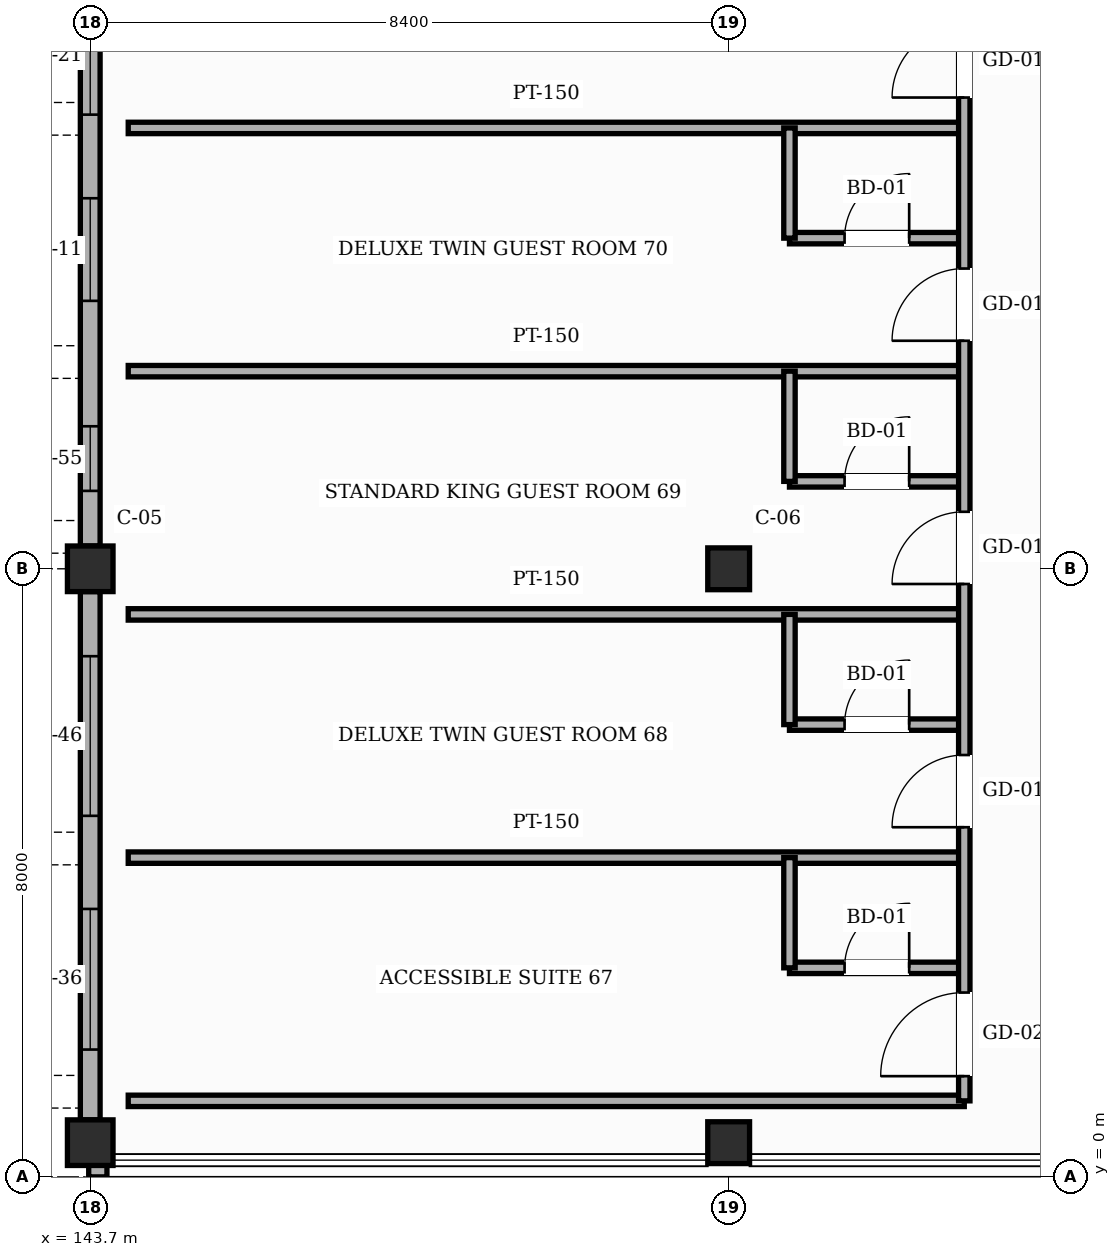
"""IFC4 building model, lengths in metres.
Left out: names, types, materials, properties, quantities, classifications, styles, units other than length and angle.
Written with IfcOpenShell. Run it as: python <this file> out.ifc"""

import sys

from ifc_helpers import new_model, si_unit, direction, frame, frame_2d, origin, origin_2d, place, context, subcontext, project, spatial, rectangle, hollow_rectangle, extrude, element, fill, save


model = new_model("IFC4")
c1 = context("Model", 3, precision=1e-05, world=origin(), true_north=direction((0.0, 1.0)))
c2 = subcontext(c1, "Body", "Model", "MODEL_VIEW")
j1 = project(units=[si_unit("LENGTHUNIT", "METRE"), si_unit("PLANEANGLEUNIT", "RADIAN")], contexts=[c1])
p1 = place(None, origin())
s1 = spatial("IfcSite", under=j1, at=p1, CompositionType="ELEMENT")
p2 = place(p1, origin())
s2 = spatial("IfcBuilding", under=s1, at=p2, CompositionType="ELEMENT")
p3 = place(p2, frame((0.0, 0.0, 24.6)))
s3 = spatial("IfcBuildingStorey", under=s2, at=p3, CompositionType="ELEMENT", Elevation=24.6)
for number, where, z_axis, x_axis in (
    (1, (143.7, 0.45, 0.0), (0.0, 0.0, 1.0), (1.0, 0.0, 0.0)),
    (2, (143.7, 8.0, 0.0), (0.0, 0.0, 1.0), (1.0, 0.0, 0.0)),
):
    element("IfcColumn", number, at=place(p3, frame(where, z_axis=z_axis, x_axis=x_axis)), inside=s3, PredefinedType="COLUMN", context=c2, shape_type="SweptSolid", body=[
        extrude(hollow_rectangle(XDim=0.6, YDim=0.6, WallThickness=0.025, InnerFilletRadius=0.025, OuterFilletRadius=0.05, at=origin_2d()), origin(), (0.0, 0.0, 1.0), 3.6),
    ])
for number, where, z_axis, x_axis in (
    (3, (152.1, 0.45, 0.0), (0.0, 0.0, 1.0), (1.0, 0.0, 0.0)),
    (4, (152.1, 8.0, 0.0), (0.0, 0.0, 1.0), (1.0, 0.0, 0.0)),
):
    element("IfcColumn", number, at=place(p3, frame(where, z_axis=z_axis, x_axis=x_axis)), inside=s3, PredefinedType="COLUMN", context=c2, shape_type="SweptSolid", body=[
        extrude(hollow_rectangle(XDim=0.55, YDim=0.55, WallThickness=0.022, InnerFilletRadius=0.022, OuterFilletRadius=0.044, at=origin_2d()), origin(), (0.0, 0.0, 1.0), 3.6),
    ])
p4 = place(p3, frame((143.7, 0.75, 0.0), z_axis=(0.0, 0.0, 1.0), x_axis=(0.0, 1.0, 0.0)))
e5 = element("IfcWall", 5, at=p4, inside=s3, PredefinedType="SOLIDWALL", context=c2, shape_type="SweptSolid", body=[
    extrude(rectangle(XDim=6.95, YDim=0.26, at=frame_2d((3.475, 0.0))), origin(), (0.0, 0.0, 1.0), 2.805),
])
p5 = place(p4, frame((0.925, 0.0, 0.85)))
e6 = element("IfcOpeningElement", 6, at=p5, cuts=e5, PredefinedType="OPENING", context=c2, shape_type="SweptSolid", body=[
    extrude(rectangle(XDim=1.85, YDim=1.35, at=frame_2d((0.925, 0.675))), frame((0.0, 0.14, 0.0), z_axis=(0.0, -1.0, 0.0), x_axis=(1.0, 0.0, 0.0)), (0.0, 0.0, 1.0), 0.28),
])
p6 = place(p4, frame((4.0, 0.0, 0.85)))
e7 = element("IfcOpeningElement", 7, at=p6, cuts=e5, PredefinedType="OPENING", context=c2, shape_type="SweptSolid", body=[
    extrude(rectangle(XDim=2.1, YDim=1.35, at=frame_2d((1.05, 0.675))), frame((0.0, 0.14, 0.0), z_axis=(0.0, -1.0, 0.0), x_axis=(1.0, 0.0, 0.0)), (0.0, 0.0, 1.0), 0.28),
])
p7 = place(p3, frame((143.7, 8.3, 0.0), z_axis=(0.0, 0.0, 1.0), x_axis=(0.0, 1.0, 0.0)))
e8 = element("IfcWall", 8, at=p7, inside=s3, PredefinedType="SOLIDWALL", context=c2, shape_type="SweptSolid", body=[
    extrude(rectangle(XDim=7.4, YDim=0.26, at=frame_2d((3.7, 0.0))), origin(), (0.0, 0.0, 1.0), 2.805),
])
p8 = place(p7, frame((0.725, 0.0, 0.85)))
e9 = element("IfcOpeningElement", 9, at=p8, cuts=e8, PredefinedType="OPENING", context=c2, shape_type="SweptSolid", body=[
    extrude(rectangle(XDim=0.85, YDim=1.35, at=frame_2d((0.425, 0.675))), frame((0.0, 0.14, 0.0), z_axis=(0.0, -1.0, 0.0), x_axis=(1.0, 0.0, 0.0)), (0.0, 0.0, 1.0), 0.28),
])
p9 = place(p7, frame((3.225, 0.0, 0.85)))
e10 = element("IfcOpeningElement", 10, at=p9, cuts=e8, PredefinedType="OPENING", context=c2, shape_type="SweptSolid", body=[
    extrude(rectangle(XDim=1.35, YDim=1.35, at=frame_2d((0.675, 0.675))), frame((0.0, 0.14, 0.0), z_axis=(0.0, -1.0, 0.0), x_axis=(1.0, 0.0, 0.0)), (0.0, 0.0, 1.0), 0.28),
])
p10 = place(p7, frame((5.675, 0.0, 0.85)))
e11 = element("IfcOpeningElement", 11, at=p10, cuts=e8, PredefinedType="OPENING", context=c2, shape_type="SweptSolid", body=[
    extrude(rectangle(XDim=1.55, YDim=1.35, at=frame_2d((0.775, 0.675))), frame((0.0, 0.14, 0.0), z_axis=(0.0, -1.0, 0.0), x_axis=(1.0, 0.0, 0.0)), (0.0, 0.0, 1.0), 0.28),
])
p11 = place(p3, frame((143.8, 0.0, 0.0), z_axis=(0.0, 0.0, 1.0), x_axis=(0.0, 1.0, 0.0)))
e12 = element("IfcWall", 12, at=p11, inside=s3, PredefinedType="SOLIDWALL", context=c2, shape_type="SweptSolid", body=[
    extrude(rectangle(XDim=0.36, YDim=0.24, at=frame_2d((0.18, 0.0))), origin(), (0.0, 0.0, 1.0), 3.365),
])
p12 = place(p3, frame((144.2, 1.0, 0.0), z_axis=(0.0, 0.0, 1.0), x_axis=(1.0, 0.0, 0.0)))
e13 = element("IfcWall", 13, at=p12, inside=s3, PredefinedType="PARTITIONING", context=c2, shape_type="SweptSolid", body=[
    extrude(rectangle(XDim=11.0, YDim=0.15, at=frame_2d((5.5, 0.0))), origin(), (0.0, 0.0, 1.0), 3.365),
])
p13 = place(p3, frame((152.9, 2.75, 0.0), z_axis=(0.0, 0.0, 1.0), x_axis=(1.0, 0.0, 0.0)))
e14 = element("IfcWall", 14, at=p13, inside=s3, PredefinedType="PARTITIONING", context=c2, shape_type="SweptSolid", body=[
    extrude(rectangle(XDim=2.3, YDim=0.15, at=frame_2d((1.15, 0.0))), origin(), (0.0, 0.0, 1.0), 3.365),
])
p14 = place(p13, frame((0.725, 0.0, 0.0)))
e15 = element("IfcOpeningElement", 15, at=p14, cuts=e14, PredefinedType="OPENING", context=c2, shape_type="SweptSolid", body=[
    extrude(rectangle(XDim=0.85, YDim=2.1, at=frame_2d((0.425, 1.05))), frame((0.0, 0.085, 0.0), z_axis=(0.0, -1.0, 0.0), x_axis=(1.0, 0.0, 0.0)), (0.0, 0.0, 1.0), 0.17),
])
p15 = place(p3, frame((144.2, 4.2, 0.0), z_axis=(0.0, 0.0, 1.0), x_axis=(1.0, 0.0, 0.0)))
e16 = element("IfcWall", 16, at=p15, inside=s3, PredefinedType="PARTITIONING", context=c2, shape_type="SweptSolid", body=[
    extrude(rectangle(XDim=11.0, YDim=0.15, at=frame_2d((5.5, 0.0))), origin(), (0.0, 0.0, 1.0), 3.005),
])
p16 = place(p3, frame((152.9, 5.95, 0.0), z_axis=(0.0, 0.0, 1.0), x_axis=(1.0, 0.0, 0.0)))
e17 = element("IfcWall", 17, at=p16, inside=s3, PredefinedType="PARTITIONING", context=c2, shape_type="SweptSolid", body=[
    extrude(rectangle(XDim=2.3, YDim=0.15, at=frame_2d((1.15, 0.0))), origin(), (0.0, 0.0, 1.0), 3.365),
])
p17 = place(p16, frame((0.725, 0.0, 0.0)))
e18 = element("IfcOpeningElement", 18, at=p17, cuts=e17, PredefinedType="OPENING", context=c2, shape_type="SweptSolid", body=[
    extrude(rectangle(XDim=0.85, YDim=2.1, at=frame_2d((0.425, 1.05))), frame((0.0, 0.085, 0.0), z_axis=(0.0, -1.0, 0.0), x_axis=(1.0, 0.0, 0.0)), (0.0, 0.0, 1.0), 0.17),
])
p18 = place(p3, frame((144.2, 7.4, 0.0), z_axis=(0.0, 0.0, 1.0), x_axis=(1.0, 0.0, 0.0)))
e19 = element("IfcWall", 19, at=p18, inside=s3, PredefinedType="PARTITIONING", context=c2, shape_type="SweptSolid", body=[
    extrude(rectangle(XDim=11.0, YDim=0.15, at=frame_2d((5.5, 0.0))), origin(), (0.0, 0.0, 1.0), 3.365),
])
p19 = place(p3, frame((152.9, 9.15, 0.0), z_axis=(0.0, 0.0, 1.0), x_axis=(1.0, 0.0, 0.0)))
e20 = element("IfcWall", 20, at=p19, inside=s3, PredefinedType="PARTITIONING", context=c2, shape_type="SweptSolid", body=[
    extrude(rectangle(XDim=2.3, YDim=0.15, at=frame_2d((1.15, 0.0))), origin(), (0.0, 0.0, 1.0), 3.365),
])
p20 = place(p19, frame((0.725, 0.0, 0.0)))
e21 = element("IfcOpeningElement", 21, at=p20, cuts=e20, PredefinedType="OPENING", context=c2, shape_type="SweptSolid", body=[
    extrude(rectangle(XDim=0.85, YDim=2.1, at=frame_2d((0.425, 1.05))), frame((0.0, 0.085, 0.0), z_axis=(0.0, -1.0, 0.0), x_axis=(1.0, 0.0, 0.0)), (0.0, 0.0, 1.0), 0.17),
])
p21 = place(p3, frame((144.2, 10.6, 0.0), z_axis=(0.0, 0.0, 1.0), x_axis=(1.0, 0.0, 0.0)))
e22 = element("IfcWall", 22, at=p21, inside=s3, PredefinedType="PARTITIONING", context=c2, shape_type="SweptSolid", body=[
    extrude(rectangle(XDim=11.0, YDim=0.15, at=frame_2d((5.5, 0.0))), origin(), (0.0, 0.0, 1.0), 3.365),
])
p22 = place(p3, frame((152.9, 12.35, 0.0), z_axis=(0.0, 0.0, 1.0), x_axis=(1.0, 0.0, 0.0)))
e23 = element("IfcWall", 23, at=p22, inside=s3, PredefinedType="PARTITIONING", context=c2, shape_type="SweptSolid", body=[
    extrude(rectangle(XDim=2.3, YDim=0.15, at=frame_2d((1.15, 0.0))), origin(), (0.0, 0.0, 1.0), 3.365),
])
p23 = place(p22, frame((0.725, 0.0, 0.0)))
e24 = element("IfcOpeningElement", 24, at=p23, cuts=e23, PredefinedType="OPENING", context=c2, shape_type="SweptSolid", body=[
    extrude(rectangle(XDim=0.85, YDim=2.1, at=frame_2d((0.425, 1.05))), frame((0.0, 0.085, 0.0), z_axis=(0.0, -1.0, 0.0), x_axis=(1.0, 0.0, 0.0)), (0.0, 0.0, 1.0), 0.17),
])
p24 = place(p3, frame((144.2, 13.8, 0.0), z_axis=(0.0, 0.0, 1.0), x_axis=(1.0, 0.0, 0.0)))
e25 = element("IfcWall", 25, at=p24, inside=s3, PredefinedType="PARTITIONING", context=c2, shape_type="SweptSolid", body=[
    extrude(rectangle(XDim=11.0, YDim=0.15, at=frame_2d((5.5, 0.0))), origin(), (0.0, 0.0, 1.0), 3.365),
])
for number, where, z_axis, x_axis in (
    (26, (152.9, 2.75, 0.0), (0.0, 0.0, 1.0), (0.0, 1.0, 0.0)),
    (27, (152.9, 5.95, 0.0), (0.0, 0.0, 1.0), (0.0, 1.0, 0.0)),
):
    element("IfcWall", number, at=place(p3, frame(where, z_axis=z_axis, x_axis=x_axis)), inside=s3, PredefinedType="PARTITIONING", context=c2, shape_type="SweptSolid", body=[
        extrude(rectangle(XDim=1.45, YDim=0.15, at=frame_2d((0.725, 0.0))), origin(), (0.0, 0.0, 1.0), 3.365),
    ])
p25 = place(p3, frame((152.9, 9.15, 0.0), z_axis=(0.0, 0.0, 1.0), x_axis=(0.0, 1.0, 0.0)))
e28 = element("IfcWall", 28, at=p25, inside=s3, PredefinedType="PARTITIONING", context=c2, shape_type="SweptSolid", body=[
    extrude(rectangle(XDim=1.45, YDim=0.15, at=frame_2d((0.725, 0.0))), origin(), (0.0, 0.0, 1.0), 3.365),
])
p26 = place(p3, frame((152.9, 12.35, 0.0), z_axis=(0.0, 0.0, 1.0), x_axis=(0.0, 1.0, 0.0)))
e29 = element("IfcWall", 29, at=p26, inside=s3, PredefinedType="PARTITIONING", context=c2, shape_type="SweptSolid", body=[
    extrude(rectangle(XDim=1.45, YDim=0.15, at=frame_2d((0.725, 0.0))), origin(), (0.0, 0.0, 1.0), 3.365),
])
p27 = place(p3, frame((155.2, 1.0, 0.0), z_axis=(0.0, 0.0, 1.0), x_axis=(0.0, 1.0, 0.0)))
e30 = element("IfcWall", 30, at=p27, inside=s3, PredefinedType="PARTITIONING", context=c2, shape_type="SweptSolid", body=[
    extrude(rectangle(XDim=25.6, YDim=0.15, at=frame_2d((12.8, 0.0))), origin(), (0.0, 0.0, 1.0), 3.365),
])
p28 = place(p27, frame((0.325, 0.0, 0.0)))
e31 = element("IfcOpeningElement", 31, at=p28, cuts=e30, PredefinedType="OPENING", context=c2, shape_type="SweptSolid", body=[
    extrude(rectangle(XDim=1.1, YDim=2.2, at=frame_2d((0.55, 1.1))), frame((0.0, 0.085, 0.0), z_axis=(0.0, -1.0, 0.0), x_axis=(1.0, 0.0, 0.0)), (0.0, 0.0, 1.0), 0.17),
])
p29 = place(p27, frame((3.6, 0.0, 0.0)))
e32 = element("IfcOpeningElement", 32, at=p29, cuts=e30, PredefinedType="OPENING", context=c2, shape_type="SweptSolid", body=[
    extrude(rectangle(XDim=0.95, YDim=2.15, at=frame_2d((0.475, 1.075))), frame((0.0, 0.085, 0.0), z_axis=(0.0, -1.0, 0.0), x_axis=(1.0, 0.0, 0.0)), (0.0, 0.0, 1.0), 0.17),
])
p30 = place(p27, frame((6.8, 0.0, 0.0)))
e33 = element("IfcOpeningElement", 33, at=p30, cuts=e30, PredefinedType="OPENING", context=c2, shape_type="SweptSolid", body=[
    extrude(rectangle(XDim=0.95, YDim=2.15, at=frame_2d((0.475, 1.075))), frame((0.0, 0.085, 0.0), z_axis=(0.0, -1.0, 0.0), x_axis=(1.0, 0.0, 0.0)), (0.0, 0.0, 1.0), 0.17),
])
p31 = place(p27, frame((10.0, 0.0, 0.0)))
e34 = element("IfcOpeningElement", 34, at=p31, cuts=e30, PredefinedType="OPENING", context=c2, shape_type="SweptSolid", body=[
    extrude(rectangle(XDim=0.95, YDim=2.15, at=frame_2d((0.475, 1.075))), frame((0.0, 0.085, 0.0), z_axis=(0.0, -1.0, 0.0), x_axis=(1.0, 0.0, 0.0)), (0.0, 0.0, 1.0), 0.17),
])
p32 = place(p27, frame((13.2, 0.0, 0.0)))
e35 = element("IfcOpeningElement", 35, at=p32, cuts=e30, PredefinedType="OPENING", context=c2, shape_type="SweptSolid", body=[
    extrude(rectangle(XDim=0.95, YDim=2.15, at=frame_2d((0.475, 1.075))), frame((0.0, 0.085, 0.0), z_axis=(0.0, -1.0, 0.0), x_axis=(1.0, 0.0, 0.0)), (0.0, 0.0, 1.0), 0.17),
])
p33 = place(p27, frame((16.4, 0.0, 0.0)))
e36 = element("IfcOpeningElement", 36, at=p33, cuts=e30, PredefinedType="OPENING", context=c2, shape_type="SweptSolid", body=[
    extrude(rectangle(XDim=0.95, YDim=2.15, at=frame_2d((0.475, 1.075))), frame((0.0, 0.085, 0.0), z_axis=(0.0, -1.0, 0.0), x_axis=(1.0, 0.0, 0.0)), (0.0, 0.0, 1.0), 0.17),
])
p34 = place(p27, frame((19.6, 0.0, 0.0)))
e37 = element("IfcOpeningElement", 37, at=p34, cuts=e30, PredefinedType="OPENING", context=c2, shape_type="SweptSolid", body=[
    extrude(rectangle(XDim=0.95, YDim=2.15, at=frame_2d((0.475, 1.075))), frame((0.0, 0.085, 0.0), z_axis=(0.0, -1.0, 0.0), x_axis=(1.0, 0.0, 0.0)), (0.0, 0.0, 1.0), 0.17),
])
p35 = place(p27, frame((22.8, 0.0, 0.0)))
e38 = element("IfcOpeningElement", 38, at=p35, cuts=e30, PredefinedType="OPENING", context=c2, shape_type="SweptSolid", body=[
    extrude(rectangle(XDim=0.95, YDim=2.15, at=frame_2d((0.475, 1.075))), frame((0.0, 0.085, 0.0), z_axis=(0.0, -1.0, 0.0), x_axis=(1.0, 0.0, 0.0)), (0.0, 0.0, 1.0), 0.17),
])
p36 = place(p5, origin())
e39 = element("IfcWindow", 39, at=p36, inside=s3, PartitioningType="SINGLE_PANEL", PredefinedType="WINDOW", context=c2, shape_type="SweptSolid", body=[
    extrude(rectangle(XDim=1.85, YDim=1.35, at=frame_2d((0.925, 0.675))), frame((0.0, 0.03, 0.0), z_axis=(0.0, -1.0, 0.0), x_axis=(1.0, 0.0, 0.0)), (0.0, 0.0, 1.0), 0.06),
])
fill(e6, e39)
p37 = place(p6, origin())
e40 = element("IfcWindow", 40, at=p37, inside=s3, PartitioningType="SINGLE_PANEL", PredefinedType="WINDOW", context=c2, shape_type="SweptSolid", body=[
    extrude(rectangle(XDim=2.1, YDim=1.35, at=frame_2d((1.05, 0.675))), frame((0.0, 0.03, 0.0), z_axis=(0.0, -1.0, 0.0), x_axis=(1.0, 0.0, 0.0)), (0.0, 0.0, 1.0), 0.06),
])
fill(e7, e40)
p38 = place(p8, origin())
e41 = element("IfcWindow", 41, at=p38, inside=s3, PartitioningType="SINGLE_PANEL", PredefinedType="WINDOW", context=c2, shape_type="SweptSolid", body=[
    extrude(rectangle(XDim=0.85, YDim=1.35, at=frame_2d((0.425, 0.675))), frame((0.0, 0.03, 0.0), z_axis=(0.0, -1.0, 0.0), x_axis=(1.0, 0.0, 0.0)), (0.0, 0.0, 1.0), 0.06),
])
fill(e9, e41)
p39 = place(p9, origin())
e42 = element("IfcWindow", 42, at=p39, inside=s3, PartitioningType="SINGLE_PANEL", PredefinedType="WINDOW", context=c2, shape_type="SweptSolid", body=[
    extrude(rectangle(XDim=1.35, YDim=1.35, at=frame_2d((0.675, 0.675))), frame((0.0, 0.03, 0.0), z_axis=(0.0, -1.0, 0.0), x_axis=(1.0, 0.0, 0.0)), (0.0, 0.0, 1.0), 0.06),
])
fill(e10, e42)
p40 = place(p10, origin())
e43 = element("IfcWindow", 43, at=p40, inside=s3, PartitioningType="SINGLE_PANEL", PredefinedType="WINDOW", context=c2, shape_type="SweptSolid", body=[
    extrude(rectangle(XDim=1.55, YDim=1.35, at=frame_2d((0.775, 0.675))), frame((0.0, 0.03, 0.0), z_axis=(0.0, -1.0, 0.0), x_axis=(1.0, 0.0, 0.0)), (0.0, 0.0, 1.0), 0.06),
])
fill(e11, e43)
p41 = place(p28, origin())
e44 = element("IfcDoor", 44, at=p41, inside=s3, OperationType="SINGLE_SWING_LEFT", PredefinedType="DOOR", context=c2, shape_type="SweptSolid", body=[
    extrude(rectangle(XDim=1.1, YDim=2.2, at=frame_2d((0.55, 1.1))), frame((0.0, 0.025, 0.0), z_axis=(0.0, -1.0, 0.0), x_axis=(1.0, 0.0, 0.0)), (0.0, 0.0, 1.0), 0.05),
])
fill(e31, e44)
p42 = place(p14, origin())
e45 = element("IfcDoor", 45, at=p42, inside=s3, OperationType="SINGLE_SWING_RIGHT", PredefinedType="DOOR", context=c2, shape_type="SweptSolid", body=[
    extrude(rectangle(XDim=0.85, YDim=2.1, at=frame_2d((0.425, 1.05))), frame((0.0, 0.025, 0.0), z_axis=(0.0, -1.0, 0.0), x_axis=(1.0, 0.0, 0.0)), (0.0, 0.0, 1.0), 0.05),
])
fill(e15, e45)
p43 = place(p29, origin())
e46 = element("IfcDoor", 46, at=p43, inside=s3, OperationType="SINGLE_SWING_LEFT", PredefinedType="DOOR", context=c2, shape_type="SweptSolid", body=[
    extrude(rectangle(XDim=0.95, YDim=2.15, at=frame_2d((0.475, 1.075))), frame((0.0, 0.025, 0.0), z_axis=(0.0, -1.0, 0.0), x_axis=(1.0, 0.0, 0.0)), (0.0, 0.0, 1.0), 0.05),
])
fill(e32, e46)
p44 = place(p17, origin())
e47 = element("IfcDoor", 47, at=p44, inside=s3, OperationType="SINGLE_SWING_RIGHT", PredefinedType="DOOR", context=c2, shape_type="SweptSolid", body=[
    extrude(rectangle(XDim=0.85, YDim=2.1, at=frame_2d((0.425, 1.05))), frame((0.0, 0.025, 0.0), z_axis=(0.0, -1.0, 0.0), x_axis=(1.0, 0.0, 0.0)), (0.0, 0.0, 1.0), 0.05),
])
fill(e18, e47)
p45 = place(p30, origin())
e48 = element("IfcDoor", 48, at=p45, inside=s3, OperationType="SINGLE_SWING_LEFT", PredefinedType="DOOR", context=c2, shape_type="SweptSolid", body=[
    extrude(rectangle(XDim=0.95, YDim=2.15, at=frame_2d((0.475, 1.075))), frame((0.0, 0.025, 0.0), z_axis=(0.0, -1.0, 0.0), x_axis=(1.0, 0.0, 0.0)), (0.0, 0.0, 1.0), 0.05),
])
fill(e33, e48)
p46 = place(p20, origin())
e49 = element("IfcDoor", 49, at=p46, inside=s3, OperationType="SINGLE_SWING_RIGHT", PredefinedType="DOOR", context=c2, shape_type="SweptSolid", body=[
    extrude(rectangle(XDim=0.85, YDim=2.1, at=frame_2d((0.425, 1.05))), frame((0.0, 0.025, 0.0), z_axis=(0.0, -1.0, 0.0), x_axis=(1.0, 0.0, 0.0)), (0.0, 0.0, 1.0), 0.05),
])
fill(e21, e49)
p47 = place(p31, origin())
e50 = element("IfcDoor", 50, at=p47, inside=s3, OperationType="SINGLE_SWING_LEFT", PredefinedType="DOOR", context=c2, shape_type="SweptSolid", body=[
    extrude(rectangle(XDim=0.95, YDim=2.15, at=frame_2d((0.475, 1.075))), frame((0.0, 0.025, 0.0), z_axis=(0.0, -1.0, 0.0), x_axis=(1.0, 0.0, 0.0)), (0.0, 0.0, 1.0), 0.05),
])
fill(e34, e50)
p48 = place(p23, origin())
e51 = element("IfcDoor", 51, at=p48, inside=s3, OperationType="SINGLE_SWING_RIGHT", PredefinedType="DOOR", context=c2, shape_type="SweptSolid", body=[
    extrude(rectangle(XDim=0.85, YDim=2.1, at=frame_2d((0.425, 1.05))), frame((0.0, 0.025, 0.0), z_axis=(0.0, -1.0, 0.0), x_axis=(1.0, 0.0, 0.0)), (0.0, 0.0, 1.0), 0.05),
])
fill(e24, e51)
p49 = place(p32, origin())
e52 = element("IfcDoor", 52, at=p49, inside=s3, OperationType="SINGLE_SWING_LEFT", PredefinedType="DOOR", context=c2, shape_type="SweptSolid", body=[
    extrude(rectangle(XDim=0.95, YDim=2.15, at=frame_2d((0.475, 1.075))), frame((0.0, 0.025, 0.0), z_axis=(0.0, -1.0, 0.0), x_axis=(1.0, 0.0, 0.0)), (0.0, 0.0, 1.0), 0.05),
])
fill(e35, e52)
save(model, sys.argv[1])
